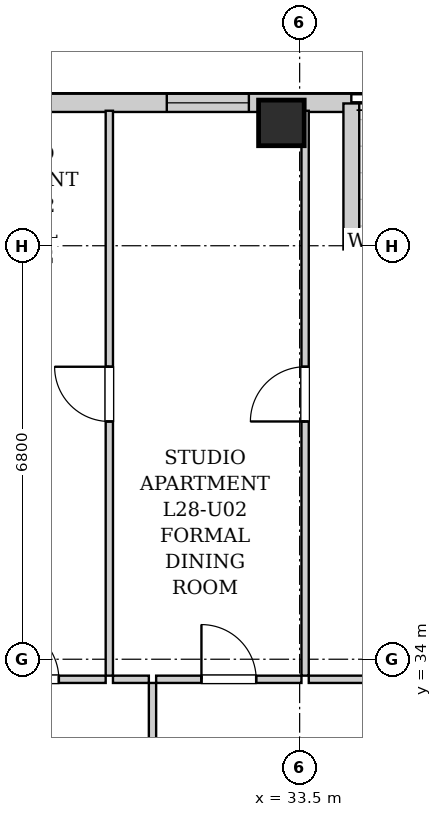
"""IFC4 building model, lengths in metres.
Left out: names, types, materials, properties, quantities, classifications, styles, units other than length and angle.
Written with IfcOpenShell. Run it as: python <this file> out.ifc"""

import sys

from ifc_helpers import new_model, si_unit, direction, frame, frame_2d, origin, origin_2d, place, context, subcontext, project, spatial, rectangle, extrude, element, fill, save


model = new_model("IFC4")
c1 = context("Model", 3, precision=1e-05, world=origin(), true_north=direction((0.0, 1.0)))
c2 = subcontext(c1, "Body", "Model", "MODEL_VIEW")
j1 = project(units=[si_unit("LENGTHUNIT", "METRE"), si_unit("PLANEANGLEUNIT", "RADIAN")], contexts=[c1])
p1 = place(None, origin())
s1 = spatial("IfcSite", under=j1, at=p1, CompositionType="ELEMENT")
p2 = place(p1, origin())
s2 = spatial("IfcBuilding", under=s1, at=p2, CompositionType="ELEMENT")
p3 = place(p2, frame((0.0, 0.0, 100.7)))
s3 = spatial("IfcBuildingStorey", under=s2, at=p3, CompositionType="ELEMENT", Elevation=100.7)
p4 = place(p3, frame((33.2, 42.82, 0.0), z_axis=(0.0, 0.0, 1.0), x_axis=(1.0, 0.0, 0.0)))
e1 = element("IfcColumn", 1, at=p4, inside=s3, PredefinedType="COLUMN", context=c2, shape_type="SweptSolid", body=[
    extrude(rectangle(XDim=0.75, YDim=0.75, at=origin_2d()), origin(), (0.0, 0.0, 1.0), 3.2),
])
p5 = place(p3, frame((10.0, 43.15, 0.0), z_axis=(0.0, 0.0, 1.0), x_axis=(1.0, 0.0, 0.0)))
e2 = element("IfcWall", 2, at=p5, inside=s3, PredefinedType="SOLIDWALL", context=c2, shape_type="SweptSolid", body=[
    extrude(rectangle(XDim=24.35, YDim=0.3, at=frame_2d((12.175, 0.0))), origin(), (0.0, 0.0, 1.0), 2.94),
])
p6 = place(p5, frame((1.956, 0.0, 0.55)))
e3 = element("IfcOpeningElement", 3, at=p6, cuts=e2, PredefinedType="OPENING", context=c2, shape_type="SweptSolid", body=[
    extrude(rectangle(XDim=1.35, YDim=1.2, at=frame_2d((0.675, 0.6))), frame((0.0, 0.16, 0.0), z_axis=(0.0, -1.0, 0.0), x_axis=(1.0, 0.0, 0.0)), (0.0, 0.0, 1.0), 0.32),
])
p7 = place(p5, frame((5.187, 0.0, 0.55)))
e4 = element("IfcOpeningElement", 4, at=p7, cuts=e2, PredefinedType="OPENING", context=c2, shape_type="SweptSolid", body=[
    extrude(rectangle(XDim=1.35, YDim=1.2, at=frame_2d((0.675, 0.6))), frame((0.0, 0.16, 0.0), z_axis=(0.0, -1.0, 0.0), x_axis=(1.0, 0.0, 0.0)), (0.0, 0.0, 1.0), 0.32),
])
p8 = place(p5, frame((8.418, 0.0, 0.55)))
e5 = element("IfcOpeningElement", 5, at=p8, cuts=e2, PredefinedType="OPENING", context=c2, shape_type="SweptSolid", body=[
    extrude(rectangle(XDim=1.35, YDim=1.2, at=frame_2d((0.675, 0.6))), frame((0.0, 0.16, 0.0), z_axis=(0.0, -1.0, 0.0), x_axis=(1.0, 0.0, 0.0)), (0.0, 0.0, 1.0), 0.32),
])
p9 = place(p5, frame((11.15, 0.0, 0.55)))
e6 = element("IfcOpeningElement", 6, at=p9, cuts=e2, PredefinedType="OPENING", context=c2, shape_type="SweptSolid", body=[
    extrude(rectangle(XDim=1.35, YDim=1.2, at=frame_2d((0.675, 0.6))), frame((0.0, 0.16, 0.0), z_axis=(0.0, -1.0, 0.0), x_axis=(1.0, 0.0, 0.0)), (0.0, 0.0, 1.0), 0.32),
])
p10 = place(p5, frame((18.038, 0.0, 0.55)))
e7 = element("IfcOpeningElement", 7, at=p10, cuts=e2, PredefinedType="OPENING", context=c2, shape_type="SweptSolid", body=[
    extrude(rectangle(XDim=1.35, YDim=1.2, at=frame_2d((0.675, 0.6))), frame((0.0, 0.16, 0.0), z_axis=(0.0, -1.0, 0.0), x_axis=(1.0, 0.0, 0.0)), (0.0, 0.0, 1.0), 0.32),
])
p11 = place(p5, frame((21.315, 0.0, 0.55)))
e8 = element("IfcOpeningElement", 8, at=p11, cuts=e2, PredefinedType="OPENING", context=c2, shape_type="SweptSolid", body=[
    extrude(rectangle(XDim=1.35, YDim=1.2, at=frame_2d((0.675, 0.6))), frame((0.0, 0.16, 0.0), z_axis=(0.0, -1.0, 0.0), x_axis=(1.0, 0.0, 0.0)), (0.0, 0.0, 1.0), 0.32),
])
p12 = place(p3, frame((34.35, 43.14, 0.0), z_axis=(0.0, 0.0, 1.0), x_axis=(0.0, -1.0, 0.0)))
e9 = element("IfcWall", 9, at=p12, inside=s3, PredefinedType="SOLIDWALL", context=c2, shape_type="SweptSolid", body=[
    extrude(rectangle(XDim=2.4, YDim=0.26, at=frame_2d((1.2, 0.0))), origin(), (0.0, 0.0, 1.0), 2.94),
])
p13 = place(p3, frame((34.484, 40.87, 0.0), z_axis=(0.0, 0.0, 1.0), x_axis=(1.0, 0.0, 0.0)))
e10 = element("IfcWall", 10, at=p13, inside=s3, PredefinedType="SOLIDWALL", context=c2, shape_type="SweptSolid", body=[
    extrude(rectangle(XDim=4.332, YDim=0.26, at=frame_2d((2.166, 0.0))), origin(), (0.0, 0.0, 1.0), 2.94),
])
p14 = place(p13, frame((1.086, 0.0, 0.0)))
e11 = element("IfcOpeningElement", 11, at=p14, cuts=e10, PredefinedType="OPENING", context=c2, shape_type="SweptSolid", body=[
    extrude(rectangle(XDim=1.1, YDim=2.0, at=frame_2d((0.55, 1.0))), frame((0.0, 0.14, 0.0), z_axis=(0.0, -1.0, 0.0), x_axis=(1.0, 0.0, 0.0)), (0.0, 0.0, 1.0), 0.28),
])
p15 = place(p13, frame((0.246, 0.0, 0.55)))
e12 = element("IfcOpeningElement", 12, at=p15, cuts=e10, PredefinedType="OPENING", context=c2, shape_type="SweptSolid", body=[
    extrude(rectangle(XDim=0.68, YDim=1.2, at=frame_2d((0.34, 0.6))), frame((0.0, 0.14, 0.0), z_axis=(0.0, -1.0, 0.0), x_axis=(1.0, 0.0, 0.0)), (0.0, 0.0, 1.0), 0.28),
])
p16 = place(p3, frame((31.08, 30.76, 0.0), z_axis=(0.0, 0.0, 1.0), x_axis=(0.0, 1.0, 0.0)))
e13 = element("IfcWall", 13, at=p16, inside=s3, PredefinedType="PARTITIONING", context=c2, shape_type="SweptSolid", body=[
    extrude(rectangle(XDim=2.85, YDim=0.12, at=frame_2d((1.425, 0.0))), origin(), (0.0, 0.0, 1.0), 2.94),
])
p17 = place(p16, frame((0.975, 0.0, 0.0)))
e14 = element("IfcOpeningElement", 14, at=p17, cuts=e13, PredefinedType="OPENING", context=c2, shape_type="SweptSolid", body=[
    extrude(rectangle(XDim=0.9, YDim=2.05, at=frame_2d((0.45, 1.025))), frame((0.0, 0.07, 0.0), z_axis=(0.0, -1.0, 0.0), x_axis=(1.0, 0.0, 0.0)), (0.0, 0.0, 1.0), 0.14),
])
p18 = place(p3, frame((27.87, 33.67, 0.0), z_axis=(0.0, 0.0, 1.0), x_axis=(1.0, 0.0, 0.0)))
e15 = element("IfcWall", 15, at=p18, inside=s3, PredefinedType="PARTITIONING", context=c2, shape_type="SweptSolid", body=[
    extrude(rectangle(XDim=2.44, YDim=0.12, at=frame_2d((1.22, 0.0))), origin(), (0.0, 0.0, 1.0), 2.94),
])
p19 = place(p18, frame((0.77, 0.0, 0.0)))
e16 = element("IfcOpeningElement", 16, at=p19, cuts=e15, PredefinedType="OPENING", context=c2, shape_type="SweptSolid", body=[
    extrude(rectangle(XDim=0.9, YDim=2.05, at=frame_2d((0.45, 1.025))), frame((0.0, 0.07, 0.0), z_axis=(0.0, -1.0, 0.0), x_axis=(1.0, 0.0, 0.0)), (0.0, 0.0, 1.0), 0.14),
])
p20 = place(p3, frame((30.43, 33.67, 0.0), z_axis=(0.0, 0.0, 1.0), x_axis=(1.0, 0.0, 0.0)))
e17 = element("IfcWall", 17, at=p20, inside=s3, PredefinedType="PARTITIONING", context=c2, shape_type="SweptSolid", body=[
    extrude(rectangle(XDim=0.59, YDim=0.12, at=frame_2d((0.295, 0.0))), origin(), (0.0, 0.0, 1.0), 2.94),
])
p21 = place(p3, frame((31.14, 33.67, 0.0), z_axis=(0.0, 0.0, 1.0), x_axis=(1.0, 0.0, 0.0)))
e18 = element("IfcWall", 18, at=p21, inside=s3, PredefinedType="PARTITIONING", context=c2, shape_type="SweptSolid", body=[
    extrude(rectangle(XDim=2.39, YDim=0.12, at=frame_2d((1.195, 0.0))), origin(), (0.0, 0.0, 1.0), 2.94),
])
p22 = place(p21, frame((0.745, 0.0, 0.0)))
e19 = element("IfcOpeningElement", 19, at=p22, cuts=e18, PredefinedType="OPENING", context=c2, shape_type="SweptSolid", body=[
    extrude(rectangle(XDim=0.9, YDim=2.05, at=frame_2d((0.45, 1.025))), frame((0.0, 0.07, 0.0), z_axis=(0.0, -1.0, 0.0), x_axis=(1.0, 0.0, 0.0)), (0.0, 0.0, 1.0), 0.14),
])
p23 = place(p3, frame((33.65, 33.67, 0.0), z_axis=(0.0, 0.0, 1.0), x_axis=(1.0, 0.0, 0.0)))
e20 = element("IfcWall", 20, at=p23, inside=s3, PredefinedType="PARTITIONING", context=c2, shape_type="SweptSolid", body=[
    extrude(rectangle(XDim=1.09, YDim=0.12, at=frame_2d((0.545, 0.0))), origin(), (0.0, 0.0, 1.0), 2.94),
])
p24 = place(p3, frame((30.37, 33.73, 0.0), z_axis=(0.0, 0.0, 1.0), x_axis=(0.0, 1.0, 0.0)))
e21 = element("IfcWall", 21, at=p24, inside=s3, PredefinedType="PARTITIONING", context=c2, shape_type="SweptSolid", body=[
    extrude(rectangle(XDim=9.29, YDim=0.12, at=frame_2d((4.645, 0.0))), origin(), (0.0, 0.0, 1.0), 2.94),
])
p25 = place(p24, frame((4.18, 0.0, 0.0)))
e22 = element("IfcOpeningElement", 22, at=p25, cuts=e21, PredefinedType="OPENING", context=c2, shape_type="SweptSolid", body=[
    extrude(rectangle(XDim=0.9, YDim=2.05, at=frame_2d((0.45, 1.025))), frame((0.0, 0.07, 0.0), z_axis=(0.0, -1.0, 0.0), x_axis=(1.0, 0.0, 0.0)), (0.0, 0.0, 1.0), 0.14),
])
p26 = place(p3, frame((33.59, 33.73, 0.0), z_axis=(0.0, 0.0, 1.0), x_axis=(0.0, 1.0, 0.0)))
e23 = element("IfcWall", 23, at=p26, inside=s3, PredefinedType="PARTITIONING", context=c2, shape_type="SweptSolid", body=[
    extrude(rectangle(XDim=9.29, YDim=0.12, at=frame_2d((4.645, 0.0))), origin(), (0.0, 0.0, 1.0), 2.94),
])
p27 = place(p26, frame((4.18, 0.0, 0.0)))
e24 = element("IfcOpeningElement", 24, at=p27, cuts=e23, PredefinedType="OPENING", context=c2, shape_type="SweptSolid", body=[
    extrude(rectangle(XDim=0.9, YDim=2.05, at=frame_2d((0.45, 1.025))), frame((0.0, 0.07, 0.0), z_axis=(0.0, -1.0, 0.0), x_axis=(1.0, 0.0, 0.0)), (0.0, 0.0, 1.0), 0.14),
])
p28 = place(p19, origin())
e25 = element("IfcDoor", 25, at=p28, inside=s3, OperationType="SINGLE_SWING_LEFT", PredefinedType="DOOR", context=c2, shape_type="SweptSolid", body=[
    extrude(rectangle(XDim=0.9, YDim=2.05, at=frame_2d((0.45, 1.025))), frame((0.0, 0.025, 0.0), z_axis=(0.0, -1.0, 0.0), x_axis=(1.0, 0.0, 0.0)), (0.0, 0.0, 1.0), 0.05),
])
fill(e16, e25)
p29 = place(p22, origin())
e26 = element("IfcDoor", 26, at=p29, inside=s3, OperationType="SINGLE_SWING_LEFT", PredefinedType="DOOR", context=c2, shape_type="SweptSolid", body=[
    extrude(rectangle(XDim=0.9, YDim=2.05, at=frame_2d((0.45, 1.025))), frame((0.0, 0.025, 0.0), z_axis=(0.0, -1.0, 0.0), x_axis=(1.0, 0.0, 0.0)), (0.0, 0.0, 1.0), 0.05),
])
fill(e19, e26)
p30 = place(p25, origin())
e27 = element("IfcDoor", 27, at=p30, inside=s3, OperationType="SINGLE_SWING_RIGHT", PredefinedType="DOOR", context=c2, shape_type="SweptSolid", body=[
    extrude(rectangle(XDim=0.9, YDim=2.05, at=frame_2d((0.45, 1.025))), frame((0.0, 0.025, 0.0), z_axis=(0.0, -1.0, 0.0), x_axis=(1.0, 0.0, 0.0)), (0.0, 0.0, 1.0), 0.05),
])
fill(e22, e27)
p31 = place(p27, origin())
e28 = element("IfcDoor", 28, at=p31, inside=s3, OperationType="SINGLE_SWING_LEFT", PredefinedType="DOOR", context=c2, shape_type="SweptSolid", body=[
    extrude(rectangle(XDim=0.9, YDim=2.05, at=frame_2d((0.45, 1.025))), frame((0.0, 0.025, 0.0), z_axis=(0.0, -1.0, 0.0), x_axis=(1.0, 0.0, 0.0)), (0.0, 0.0, 1.0), 0.05),
])
fill(e24, e28)
p32 = place(p11, origin())
e29 = element("IfcWindow", 29, at=p32, inside=s3, PartitioningType="SINGLE_PANEL", PredefinedType="WINDOW", context=c2, shape_type="SweptSolid", body=[
    extrude(rectangle(XDim=1.35, YDim=1.2, at=frame_2d((0.675, 0.6))), frame((0.0, 0.03, 0.0), z_axis=(0.0, -1.0, 0.0), x_axis=(1.0, 0.0, 0.0)), (0.0, 0.0, 1.0), 0.06),
])
fill(e8, e29)
save(model, sys.argv[1])
